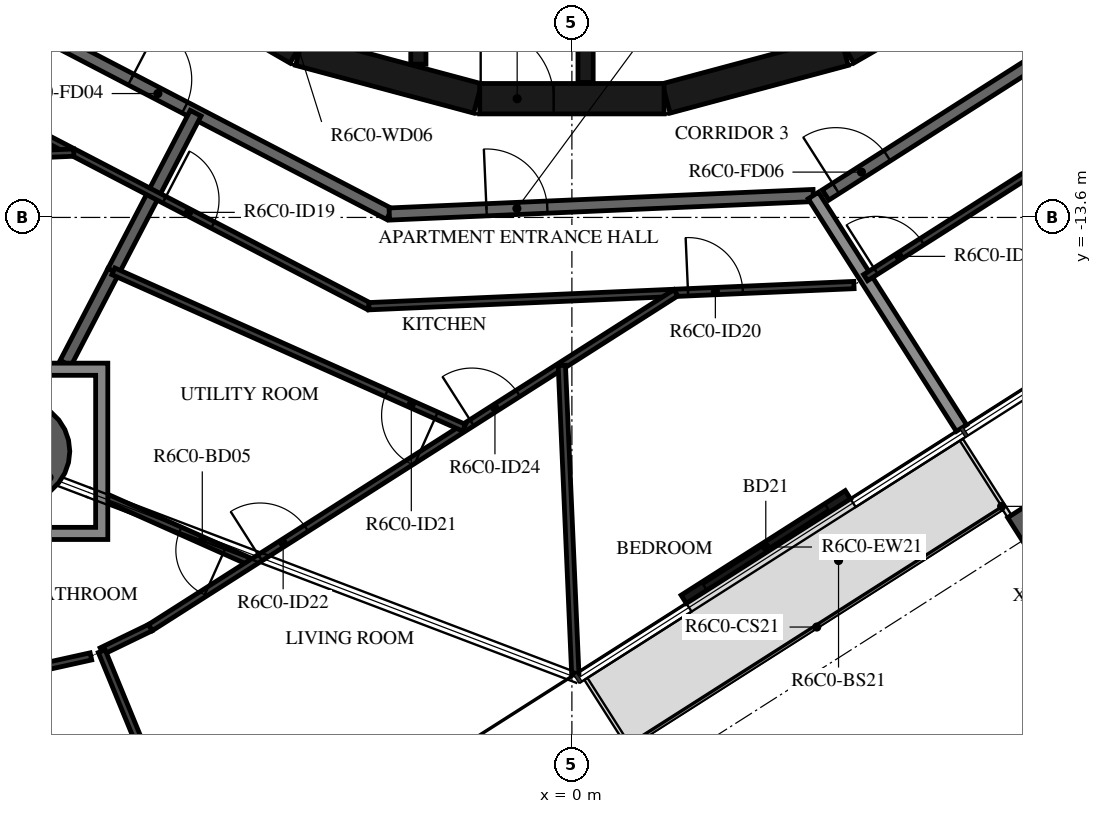
"""IFC4 building model, lengths in metres.
Left out: names, types, materials, properties, quantities, classifications, styles, units other than length and angle.
Written with IfcOpenShell. Run it as: python <this file> out.ifc"""

import sys

from ifc_helpers import new_model, si_unit, direction, frame, frame_2d, origin, origin_2d, place, context, subcontext, project, spatial, polyline, rectangle, hollow_circle, i_section, outline, extrude, element, fill, save


model = new_model("IFC4")
c1 = context("Model", 3, precision=1e-05, world=origin(), true_north=direction((0.0, 1.0)))
c2 = subcontext(c1, "Body", "Model", "MODEL_VIEW")
j1 = project(units=[si_unit("LENGTHUNIT", "METRE"), si_unit("PLANEANGLEUNIT", "RADIAN")], contexts=[c1])
p1 = place(None, origin())
s1 = spatial("IfcSite", under=j1, at=p1, CompositionType="ELEMENT")
p2 = place(p1, origin())
s2 = spatial("IfcBuilding", under=s1, at=p2, CompositionType="ELEMENT")
p3 = place(p2, frame((0.0, 0.0, 247.7)))
s3 = spatial("IfcBuildingStorey", under=s2, at=p3, CompositionType="ELEMENT", Elevation=247.7)
p4 = place(p3, frame((-9.082, -17.446, -0.38), z_axis=(0.0, 0.0, 1.0), x_axis=(1.0, 0.0, 0.0)))
e1 = element("IfcColumn", 1, at=p4, inside=s3, PredefinedType="COLUMN", context=c2, shape_type="SweptSolid", body=[
    extrude(hollow_circle(Radius=0.825, WallThickness=0.04, at=origin_2d()), origin(), (0.0, 0.0, 1.0), 3.5),
])
p5 = place(p3, frame((7.535, -18.835, -0.38), z_axis=(0.0, 0.0, 1.0), x_axis=(-0.843391139633, -0.537300088953, 0.0)))
e2 = element("IfcColumn", 2, at=p5, inside=s3, PredefinedType="COLUMN", context=c2, shape_type="SweptSolid", body=[
    extrude(i_section(OverallWidth=0.3, OverallDepth=0.9, WebThickness=0.019, FlangeThickness=0.035, FilletRadius=0.03, at=origin_2d()), origin(), (0.0, 0.0, 1.0), 3.5),
])
p6 = place(p3, frame((1.839, -19.879, 0.0), z_axis=(0.0, 0.0, 1.0), x_axis=(0.843419508298, 0.53725555653, 0.0)))
e3 = element("IfcWall", 3, at=p6, inside=s3, PredefinedType="STANDARD", context=c2, shape_type="SweptSolid", body=[
    extrude(rectangle(XDim=3.2, YDim=0.16, at=frame_2d((1.6, 0.0))), origin(), (0.0, 0.0, 1.0), 3.12),
])
p7 = place(p6, frame((0.4, 0.0, 0.0)))
e4 = element("IfcOpeningElement", 4, at=p7, cuts=e3, PredefinedType="OPENING", context=c2, shape_type="SweptSolid", body=[
    extrude(rectangle(XDim=2.4, YDim=2.4, at=frame_2d((1.2, 1.2))), frame((0.0, 0.09, 0.0), z_axis=(0.0, -1.0, 0.0), x_axis=(1.0, 0.0, 0.0)), (0.0, 0.0, 1.0), 0.18),
])
p8 = place(p3, frame((1.55, -11.643, 0.0), z_axis=(0.0, 0.0, 1.0), x_axis=(0.965948410781, 0.258734743916, 0.0)))
e5 = element("IfcWall", 5, at=p8, inside=s3, PredefinedType="SHEAR", context=c2, shape_type="SweptSolid", body=[
    extrude(rectangle(XDim=3.033, YDim=0.5, at=frame_2d((1.516, 0.0))), origin(), (0.0, 0.0, 1.0), 3.12),
])
p9 = place(p3, frame((4.51, -10.845, 0.0), z_axis=(0.0, 0.0, 1.0), x_axis=(0.865975092491, 0.500087131594, 0.0)))
e6 = element("IfcWall", 6, at=p9, inside=s3, PredefinedType="SHEAR", context=c2, shape_type="SweptSolid", body=[
    extrude(rectangle(XDim=3.033, YDim=0.5, at=frame_2d((1.516, 0.0))), origin(), (0.0, 0.0, 1.0), 3.12),
])
p10 = place(p9, frame((1.066, 0.0, 0.0)))
e7 = element("IfcOpeningElement", 7, at=p10, cuts=e6, PredefinedType="OPENING", context=c2, shape_type="SweptSolid", body=[
    extrude(rectangle(XDim=0.9, YDim=2.1, at=frame_2d((0.45, 1.05))), frame((0.0, 0.26, 0.0), z_axis=(0.0, -1.0, 0.0), x_axis=(1.0, 0.0, 0.0)), (0.0, 0.0, 1.0), 0.52),
])
for number, where, z_axis, x_axis in (
    (8, (-7.137, -9.329, 0.0), (0.0, 0.0, 1.0), (0.866, -0.5, 0.0)),
    (9, (-4.479, -10.858, 0.0), (0.0, 0.0, 1.0), (0.966, -0.259, 0.0)),
):
    element("IfcWall", number, at=place(p3, frame(where, z_axis=z_axis, x_axis=x_axis)), inside=s3, PredefinedType="SHEAR", context=c2, shape_type="SweptSolid", body=[
        extrude(rectangle(XDim=3.033, YDim=0.5, at=frame_2d((1.516, 0.0))), origin(), (0.0, 0.0, 1.0), 3.12),
    ])
p11 = place(p3, frame((-1.516, -11.647, 0.0), z_axis=(0.0, 0.0, 1.0), x_axis=(1.0, 0.0, 0.0)))
e10 = element("IfcWall", 10, at=p11, inside=s3, PredefinedType="SHEAR", context=c2, shape_type="SweptSolid", body=[
    extrude(rectangle(XDim=3.033, YDim=0.5, at=frame_2d((1.516, 0.0))), origin(), (0.0, 0.0, 1.0), 3.12),
])
p12 = place(p11, frame((0.016, 0.0, 0.0)))
e11 = element("IfcOpeningElement", 11, at=p12, cuts=e10, PredefinedType="OPENING", context=c2, shape_type="SweptSolid", body=[
    extrude(rectangle(XDim=1.2, YDim=2.1, at=frame_2d((0.6, 1.05))), frame((0.0, 0.26, 0.0), z_axis=(0.0, -1.0, 0.0), x_axis=(1.0, 0.0, 0.0)), (0.0, 0.0, 1.0), 0.52),
])
p13 = place(p3, frame((-2.525, -8.97, 0.0), z_axis=(0.0, 0.0, 1.0), x_axis=(0.0, -1.0, 0.0)))
e12 = element("IfcWall", 12, at=p13, inside=s3, PredefinedType="SHEAR", context=c2, shape_type="SweptSolid", body=[
    extrude(rectangle(XDim=2.11, YDim=0.25, at=frame_2d((1.055, 0.0))), origin(), (0.0, 0.0, 1.0), 3.12),
])
p14 = place(p3, frame((0.225, -8.97, 0.0), z_axis=(0.0, 0.0, 1.0), x_axis=(0.0, -1.0, 0.0)))
e13 = element("IfcWall", 13, at=p14, inside=s3, PredefinedType="SHEAR", context=c2, shape_type="SweptSolid", body=[
    extrude(rectangle(XDim=2.41, YDim=0.25, at=frame_2d((1.205, 0.0))), origin(), (0.0, 0.0, 1.0), 3.12),
])
p15 = place(p3, frame((-9.372, -10.228, 0.0), z_axis=(0.0, 0.0, 1.0), x_axis=(0.887005184532, -0.461759464021, 0.0)))
e14 = element("IfcWall", 14, at=p15, inside=s3, PredefinedType="STANDARD", context=c2, shape_type="SweptSolid", body=[
    extrude(rectangle(XDim=7.181, YDim=0.2, at=frame_2d((3.591, 0.0))), origin(), (0.0, 0.0, 1.0), 3.12),
])
p16 = place(p15, frame((2.391, 0.0, 0.0)))
e15 = element("IfcOpeningElement", 15, at=p16, cuts=e14, PredefinedType="OPENING", context=c2, shape_type="SweptSolid", body=[
    extrude(rectangle(XDim=1.0, YDim=2.1, at=frame_2d((0.5, 1.05))), frame((0.0, 0.11, 0.0), z_axis=(0.0, -1.0, 0.0), x_axis=(1.0, 0.0, 0.0)), (0.0, 0.0, 1.0), 0.22),
])
p17 = place(p3, frame((-3.003, -13.544, 0.0), z_axis=(0.0, 0.0, 1.0), x_axis=(0.999048221872, 0.043619380718, 0.0)))
e16 = element("IfcWall", 16, at=p17, inside=s3, PredefinedType="STANDARD", context=c2, shape_type="SweptSolid", body=[
    extrude(rectangle(XDim=6.979, YDim=0.2, at=frame_2d((3.49, 0.0))), origin(), (0.0, 0.0, 1.0), 3.12),
])
p18 = place(p17, frame((1.6, 0.0, 0.0)))
e17 = element("IfcOpeningElement", 17, at=p18, cuts=e16, PredefinedType="OPENING", context=c2, shape_type="SweptSolid", body=[
    extrude(rectangle(XDim=1.0, YDim=2.1, at=frame_2d((0.5, 1.05))), frame((0.0, 0.11, 0.0), z_axis=(0.0, -1.0, 0.0), x_axis=(1.0, 0.0, 0.0)), (0.0, 0.0, 1.0), 0.22),
])
p19 = place(p3, frame((4.172, -13.231, 0.0), z_axis=(0.0, 0.0, 1.0), x_axis=(0.843388394728, 0.537304397561, 0.0)))
e18 = element("IfcWall", 18, at=p19, inside=s3, PredefinedType="STANDARD", context=c2, shape_type="SweptSolid", body=[
    extrude(rectangle(XDim=7.181, YDim=0.2, at=frame_2d((3.59, 0.0))), origin(), (0.0, 0.0, 1.0), 3.12),
])
p20 = place(p19, frame((0.2, 0.0, 0.0)))
e19 = element("IfcOpeningElement", 19, at=p20, cuts=e18, PredefinedType="OPENING", context=c2, shape_type="SweptSolid", body=[
    extrude(rectangle(XDim=1.0, YDim=2.1, at=frame_2d((0.5, 1.05))), frame((0.0, 0.11, 0.0), z_axis=(0.0, -1.0, 0.0), x_axis=(1.0, 0.0, 0.0)), (0.0, 0.0, 1.0), 0.22),
])
p21 = place(p3, frame((-7.541, -14.486, 0.0), z_axis=(0.0, 0.0, 1.0), x_axis=(0.461746051786, 0.88701216658, 0.0)))
e20 = element("IfcWall", 20, at=p21, inside=s3, PredefinedType="STANDARD", context=c2, shape_type="SweptSolid", body=[
    extrude(rectangle(XDim=2.931, YDim=0.2, at=frame_2d((1.466, 0.0))), origin(), (0.0, 0.0, 1.0), 3.12),
])
p22 = place(p3, frame((-8.327, -15.996, 0.0), z_axis=(0.0, 0.0, 1.0), x_axis=(0.461722915657, 0.887024210017, 0.0)))
e21 = element("IfcWall", 21, at=p22, inside=s3, PredefinedType="STANDARD", context=c2, shape_type="SweptSolid", body=[
    extrude(rectangle(XDim=1.703, YDim=0.2, at=frame_2d((0.851, 0.0))), origin(), (0.0, 0.0, 1.0), 3.12),
])
p23 = place(p3, frame((6.407, -17.064, 0.0), z_axis=(0.0, 0.0, 1.0), x_axis=(-0.537324777979, 0.843375410461, 0.0)))
e22 = element("IfcWall", 22, at=p23, inside=s3, PredefinedType="STANDARD", context=c2, shape_type="SweptSolid", body=[
    extrude(rectangle(XDim=4.535, YDim=0.2, at=frame_2d((2.268, 0.0))), origin(), (0.0, 0.0, 1.0), 2.73),
])
p24 = place(p3, frame((-10.421, -11.373, 0.0), z_axis=(0.0, 0.0, 1.0), x_axis=(0.887012970857, -0.461744506769, 0.0)))
e23 = element("IfcWall", 23, at=p24, inside=s3, PredefinedType="PARTITIONING", context=c2, shape_type="SweptSolid", body=[
    extrude(rectangle(XDim=7.985, YDim=0.12, at=frame_2d((3.992, 0.0))), origin(), (0.0, 0.0, 1.0), 3.12),
])
p25 = place(p24, frame((4.192, 0.0, 0.0)))
e24 = element("IfcOpeningElement", 24, at=p25, cuts=e23, PredefinedType="OPENING", context=c2, shape_type="SweptSolid", body=[
    extrude(rectangle(XDim=0.9, YDim=2.1, at=frame_2d((0.45, 1.05))), frame((0.0, 0.07, 0.0), z_axis=(0.0, -1.0, 0.0), x_axis=(1.0, 0.0, 0.0)), (0.0, 0.0, 1.0), 0.14),
])
p26 = place(p3, frame((-13.69, -12.774, 0.0), z_axis=(0.0, 0.0, 1.0), x_axis=(0.999048778431, 0.043606631553, 0.0)))
e25 = element("IfcWall", 25, at=p26, inside=s3, PredefinedType="PARTITIONING", context=c2, shape_type="SweptSolid", body=[
    extrude(rectangle(XDim=5.503, YDim=0.12, at=frame_2d((2.752, 0.0))), origin(), (0.0, 0.0, 1.0), 3.12),
])
p27 = place(p26, frame((0.6, 0.0, 0.0)))
e26 = element("IfcOpeningElement", 26, at=p27, cuts=e25, PredefinedType="OPENING", context=c2, shape_type="SweptSolid", body=[
    extrude(rectangle(XDim=0.9, YDim=2.1, at=frame_2d((0.45, 1.05))), frame((0.0, 0.07, 0.0), z_axis=(0.0, -1.0, 0.0), x_axis=(1.0, 0.0, 0.0)), (0.0, 0.0, 1.0), 0.14),
])
p28 = place(p3, frame((-3.339, -15.06, 0.0), z_axis=(0.0, 0.0, 1.0), x_axis=(0.999047716945, 0.043630943905, 0.0)))
e27 = element("IfcWall", 27, at=p28, inside=s3, PredefinedType="PARTITIONING", context=c2, shape_type="SweptSolid", body=[
    extrude(rectangle(XDim=7.985, YDim=0.12, at=frame_2d((3.992, 0.0))), origin(), (0.0, 0.0, 1.0), 3.12),
])
p29 = place(p28, frame((5.253, 0.0, 0.0)))
e28 = element("IfcOpeningElement", 28, at=p29, cuts=e27, PredefinedType="OPENING", context=c2, shape_type="SweptSolid", body=[
    extrude(rectangle(XDim=0.9, YDim=2.1, at=frame_2d((0.45, 1.05))), frame((0.0, 0.07, 0.0), z_axis=(0.0, -1.0, 0.0), x_axis=(1.0, 0.0, 0.0)), (0.0, 0.0, 1.0), 0.14),
])
p30 = place(p3, frame((-8.719, -20.998, 0.0), z_axis=(0.0, 0.0, 1.0), x_axis=(0.976339323235, 0.216244134959, 0.0)))
e29 = element("IfcWall", 29, at=p30, inside=s3, PredefinedType="PARTITIONING", context=c2, shape_type="SweptSolid", body=[
    extrude(rectangle(XDim=0.829, YDim=0.12, at=frame_2d((0.414, 0.0))), origin(), (0.0, 0.0, 1.0), 3.12),
])
p31 = place(p3, frame((-5.256, -19.278, 0.0), z_axis=(0.0, 0.0, 1.0), x_axis=(-0.913284429849, 0.407322415532, 0.0)))
e30 = element("IfcWall", 30, at=p31, inside=s3, PredefinedType="PARTITIONING", context=c2, shape_type="SweptSolid", body=[
    extrude(rectangle(XDim=2.601, YDim=0.12, at=frame_2d((1.301, 0.0))), origin(), (0.0, 0.0, 1.0), 3.12),
])
p32 = place(p31, frame((0.5, 0.0, 0.0)))
e31 = element("IfcOpeningElement", 31, at=p32, cuts=e30, PredefinedType="OPENING", context=c2, shape_type="SweptSolid", body=[
    extrude(rectangle(XDim=0.8, YDim=2.1, at=frame_2d((0.4, 1.05))), frame((0.0, 0.07, 0.0), z_axis=(0.0, -1.0, 0.0), x_axis=(1.0, 0.0, 0.0)), (0.0, 0.0, 1.0), 0.14),
])
p33 = place(p3, frame((-7.732, -20.732, 0.0), z_axis=(0.0, 0.0, 1.0), x_axis=(0.900065466697, 0.435754696659, 0.0)))
e32 = element("IfcWall", 32, at=p33, inside=s3, PredefinedType="PARTITIONING", context=c2, shape_type="SweptSolid", body=[
    extrude(rectangle(XDim=0.889, YDim=0.12, at=frame_2d((0.445, 0.0))), origin(), (0.0, 0.0, 1.0), 3.12),
])
p34 = place(p3, frame((-6.932, -20.345, 0.0), z_axis=(0.0, 0.0, 1.0), x_axis=(0.843388627156, 0.537304032726, 0.0)))
e33 = element("IfcWall", 33, at=p34, inside=s3, PredefinedType="PARTITIONING", context=c2, shape_type="SweptSolid", body=[
    extrude(rectangle(XDim=10.246, YDim=0.12, at=frame_2d((5.123, 0.0))), origin(), (0.0, 0.0, 1.0), 3.12),
])
p35 = place(p34, frame((2.138, 0.0, 0.0)))
e34 = element("IfcOpeningElement", 34, at=p35, cuts=e33, PredefinedType="OPENING", context=c2, shape_type="SweptSolid", body=[
    extrude(rectangle(XDim=0.9, YDim=2.1, at=frame_2d((0.45, 1.05))), frame((0.0, 0.07, 0.0), z_axis=(0.0, -1.0, 0.0), x_axis=(1.0, 0.0, 0.0)), (0.0, 0.0, 1.0), 0.14),
])
p36 = place(p34, frame((6.268, 0.0, 0.0)))
e35 = element("IfcOpeningElement", 35, at=p36, cuts=e33, PredefinedType="OPENING", context=c2, shape_type="SweptSolid", body=[
    extrude(rectangle(XDim=0.9, YDim=2.1, at=frame_2d((0.45, 1.05))), frame((0.0, 0.07, 0.0), z_axis=(0.0, -1.0, 0.0), x_axis=(1.0, 0.0, 0.0)), (0.0, 0.0, 1.0), 0.14),
])
p37 = place(p3, frame((-6.057, -24.81, 0.0), z_axis=(0.0, 0.0, 1.0), x_axis=(-0.380044941584, 0.924968022354, 0.0)))
e36 = element("IfcWall", 36, at=p37, inside=s3, PredefinedType="PARTITIONING", context=c2, shape_type="SweptSolid", body=[
    extrude(rectangle(XDim=4.408, YDim=0.12, at=frame_2d((2.204, 0.0))), origin(), (0.0, 0.0, 1.0), 3.12),
])
p38 = place(p37, frame((0.2, 0.0, 0.0)))
e37 = element("IfcOpeningElement", 37, at=p38, cuts=e36, PredefinedType="OPENING", context=c2, shape_type="SweptSolid", body=[
    extrude(rectangle(XDim=0.9, YDim=2.1, at=frame_2d((0.45, 1.05))), frame((0.0, 0.07, 0.0), z_axis=(0.0, -1.0, 0.0), x_axis=(1.0, 0.0, 0.0)), (0.0, 0.0, 1.0), 0.14),
])
p39 = place(p3, frame((-1.773, -17.059, 0.0), z_axis=(0.0, 0.0, 1.0), x_axis=(-0.913279926902, 0.407332511736, 0.0)))
e38 = element("IfcWall", 38, at=p39, inside=s3, PredefinedType="PARTITIONING", context=c2, shape_type="SweptSolid", body=[
    extrude(rectangle(XDim=6.315, YDim=0.12, at=frame_2d((3.158, 0.0))), origin(), (0.0, 0.0, 1.0), 3.12),
])
p40 = place(p39, frame((0.5, 0.0, 0.0)))
e39 = element("IfcOpeningElement", 39, at=p40, cuts=e38, PredefinedType="OPENING", context=c2, shape_type="SweptSolid", body=[
    extrude(rectangle(XDim=0.9, YDim=2.1, at=frame_2d((0.45, 1.05))), frame((0.0, 0.07, 0.0), z_axis=(0.0, -1.0, 0.0), x_axis=(1.0, 0.0, 0.0)), (0.0, 0.0, 1.0), 0.14),
])
p41 = place(p3, frame((0.056, -21.11, 0.0), z_axis=(0.0, 0.0, 1.0), x_axis=(-0.043583193193, 0.999049801197, 0.0)))
e40 = element("IfcWall", 40, at=p41, inside=s3, PredefinedType="PARTITIONING", context=c2, shape_type="SweptSolid", body=[
    extrude(rectangle(XDim=5.081, YDim=0.12, at=frame_2d((2.541, 0.0))), origin(), (0.0, 0.0, 1.0), 3.12),
])
p42 = place(p3, frame((4.83, -14.59, 0.0), z_axis=(0.0, 0.0, 1.0), x_axis=(0.843393042763, 0.537297101629, 0.0)))
e41 = element("IfcWall", 41, at=p42, inside=s3, PredefinedType="PARTITIONING", context=c2, shape_type="SweptSolid", body=[
    extrude(rectangle(XDim=7.53, YDim=0.12, at=frame_2d((3.765, 0.0))), origin(), (0.0, 0.0, 1.0), 3.12),
])
p43 = place(p42, frame((0.2, 0.0, 0.0)))
e42 = element("IfcOpeningElement", 42, at=p43, cuts=e41, PredefinedType="OPENING", context=c2, shape_type="SweptSolid", body=[
    extrude(rectangle(XDim=0.9, YDim=2.1, at=frame_2d((0.45, 1.05))), frame((0.0, 0.07, 0.0), z_axis=(0.0, -1.0, 0.0), x_axis=(1.0, 0.0, 0.0)), (0.0, 0.0, 1.0), 0.14),
])
p44 = place(p3, origin())
e43 = element("IfcWall", 43, at=p44, inside=s3, PredefinedType="STANDARD", context=c2, shape_type="SweptSolid", body=[
    extrude(outline(polyline([(-7.632, -15.996), (-7.632, -18.896), (-10.532, -18.896), (-10.532, -15.996), (-7.632, -15.996)]), holes=[polyline([(-10.332, -18.696), (-7.832, -18.696), (-7.832, -16.196), (-10.332, -16.196), (-10.332, -18.696)])]), origin(), (0.0, 0.0, 1.0), 3.12),
])
p45 = place(p7, origin())
e44 = element("IfcDoor", 44, at=p45, inside=s3, OperationType="DOUBLE_DOOR_SLIDING", PredefinedType="DOOR", context=c2, shape_type="SweptSolid", body=[
    extrude(rectangle(XDim=2.4, YDim=2.4, at=frame_2d((1.2, 1.2))), frame((0.0, 0.025, 0.0), z_axis=(0.0, -1.0, 0.0), x_axis=(1.0, 0.0, 0.0)), (0.0, 0.0, 1.0), 0.05),
])
fill(e4, e44)
p46 = place(p12, origin())
e45 = element("IfcDoor", 45, at=p46, inside=s3, OperationType="SINGLE_SWING_RIGHT", PredefinedType="DOOR", context=c2, shape_type="SweptSolid", body=[
    extrude(rectangle(XDim=1.2, YDim=2.1, at=frame_2d((0.6, 1.05))), frame((0.0, 0.025, 0.0), z_axis=(0.0, -1.0, 0.0), x_axis=(1.0, 0.0, 0.0)), (0.0, 0.0, 1.0), 0.05),
])
fill(e11, e45)
p47 = place(p16, origin())
e46 = element("IfcDoor", 46, at=p47, inside=s3, OperationType="SINGLE_SWING_RIGHT", PredefinedType="DOOR", context=c2, shape_type="SweptSolid", body=[
    extrude(rectangle(XDim=1.0, YDim=2.1, at=frame_2d((0.5, 1.05))), frame((0.0, 0.025, 0.0), z_axis=(0.0, -1.0, 0.0), x_axis=(1.0, 0.0, 0.0)), (0.0, 0.0, 1.0), 0.05),
])
fill(e15, e46)
p48 = place(p18, origin())
e47 = element("IfcDoor", 47, at=p48, inside=s3, OperationType="SINGLE_SWING_LEFT", PredefinedType="DOOR", context=c2, shape_type="SweptSolid", body=[
    extrude(rectangle(XDim=1.0, YDim=2.1, at=frame_2d((0.5, 1.05))), frame((0.0, 0.025, 0.0), z_axis=(0.0, -1.0, 0.0), x_axis=(1.0, 0.0, 0.0)), (0.0, 0.0, 1.0), 0.05),
])
fill(e17, e47)
p49 = place(p25, origin())
e48 = element("IfcDoor", 48, at=p49, inside=s3, OperationType="SINGLE_SWING_LEFT", PredefinedType="DOOR", context=c2, shape_type="SweptSolid", body=[
    extrude(rectangle(XDim=0.9, YDim=2.1, at=frame_2d((0.45, 1.05))), frame((0.0, 0.025, 0.0), z_axis=(0.0, -1.0, 0.0), x_axis=(1.0, 0.0, 0.0)), (0.0, 0.0, 1.0), 0.05),
])
fill(e24, e48)
p50 = place(p29, origin())
e49 = element("IfcDoor", 49, at=p50, inside=s3, OperationType="SINGLE_SWING_LEFT", PredefinedType="DOOR", context=c2, shape_type="SweptSolid", body=[
    extrude(rectangle(XDim=0.9, YDim=2.1, at=frame_2d((0.45, 1.05))), frame((0.0, 0.025, 0.0), z_axis=(0.0, -1.0, 0.0), x_axis=(1.0, 0.0, 0.0)), (0.0, 0.0, 1.0), 0.05),
])
fill(e28, e49)
p51 = place(p40, origin())
e50 = element("IfcDoor", 50, at=p51, inside=s3, OperationType="SINGLE_SWING_LEFT", PredefinedType="DOOR", context=c2, shape_type="SweptSolid", body=[
    extrude(rectangle(XDim=0.9, YDim=2.1, at=frame_2d((0.45, 1.05))), frame((0.0, 0.025, 0.0), z_axis=(0.0, -1.0, 0.0), x_axis=(1.0, 0.0, 0.0)), (0.0, 0.0, 1.0), 0.05),
])
fill(e39, e50)
p52 = place(p32, origin())
e51 = element("IfcDoor", 51, at=p52, inside=s3, OperationType="SINGLE_SWING_LEFT", PredefinedType="DOOR", context=c2, shape_type="SweptSolid", body=[
    extrude(rectangle(XDim=0.8, YDim=2.1, at=frame_2d((0.4, 1.05))), frame((0.0, 0.025, 0.0), z_axis=(0.0, -1.0, 0.0), x_axis=(1.0, 0.0, 0.0)), (0.0, 0.0, 1.0), 0.05),
])
fill(e31, e51)
p53 = place(p35, origin())
e52 = element("IfcDoor", 52, at=p53, inside=s3, OperationType="SINGLE_SWING_LEFT", PredefinedType="DOOR", context=c2, shape_type="SweptSolid", body=[
    extrude(rectangle(XDim=0.9, YDim=2.1, at=frame_2d((0.45, 1.05))), frame((0.0, 0.025, 0.0), z_axis=(0.0, -1.0, 0.0), x_axis=(1.0, 0.0, 0.0)), (0.0, 0.0, 1.0), 0.05),
])
fill(e34, e52)
p54 = place(p36, origin())
e53 = element("IfcDoor", 53, at=p54, inside=s3, OperationType="SINGLE_SWING_RIGHT", PredefinedType="DOOR", context=c2, shape_type="SweptSolid", body=[
    extrude(rectangle(XDim=0.9, YDim=2.1, at=frame_2d((0.45, 1.05))), frame((0.0, 0.025, 0.0), z_axis=(0.0, -1.0, 0.0), x_axis=(1.0, 0.0, 0.0)), (0.0, 0.0, 1.0), 0.05),
])
fill(e35, e53)
p55 = place(p20, origin())
e54 = element("IfcDoor", 54, at=p55, inside=s3, OperationType="SINGLE_SWING_LEFT", PredefinedType="DOOR", context=c2, shape_type="SweptSolid", body=[
    extrude(rectangle(XDim=1.0, YDim=2.1, at=frame_2d((0.5, 1.05))), frame((0.0, 0.025, 0.0), z_axis=(0.0, -1.0, 0.0), x_axis=(1.0, 0.0, 0.0)), (0.0, 0.0, 1.0), 0.05),
])
fill(e19, e54)
p56 = place(p43, origin())
e55 = element("IfcDoor", 55, at=p56, inside=s3, OperationType="SINGLE_SWING_LEFT", PredefinedType="DOOR", context=c2, shape_type="SweptSolid", body=[
    extrude(rectangle(XDim=0.9, YDim=2.1, at=frame_2d((0.45, 1.05))), frame((0.0, 0.025, 0.0), z_axis=(0.0, -1.0, 0.0), x_axis=(1.0, 0.0, 0.0)), (0.0, 0.0, 1.0), 0.05),
])
fill(e42, e55)
save(model, sys.argv[1])
